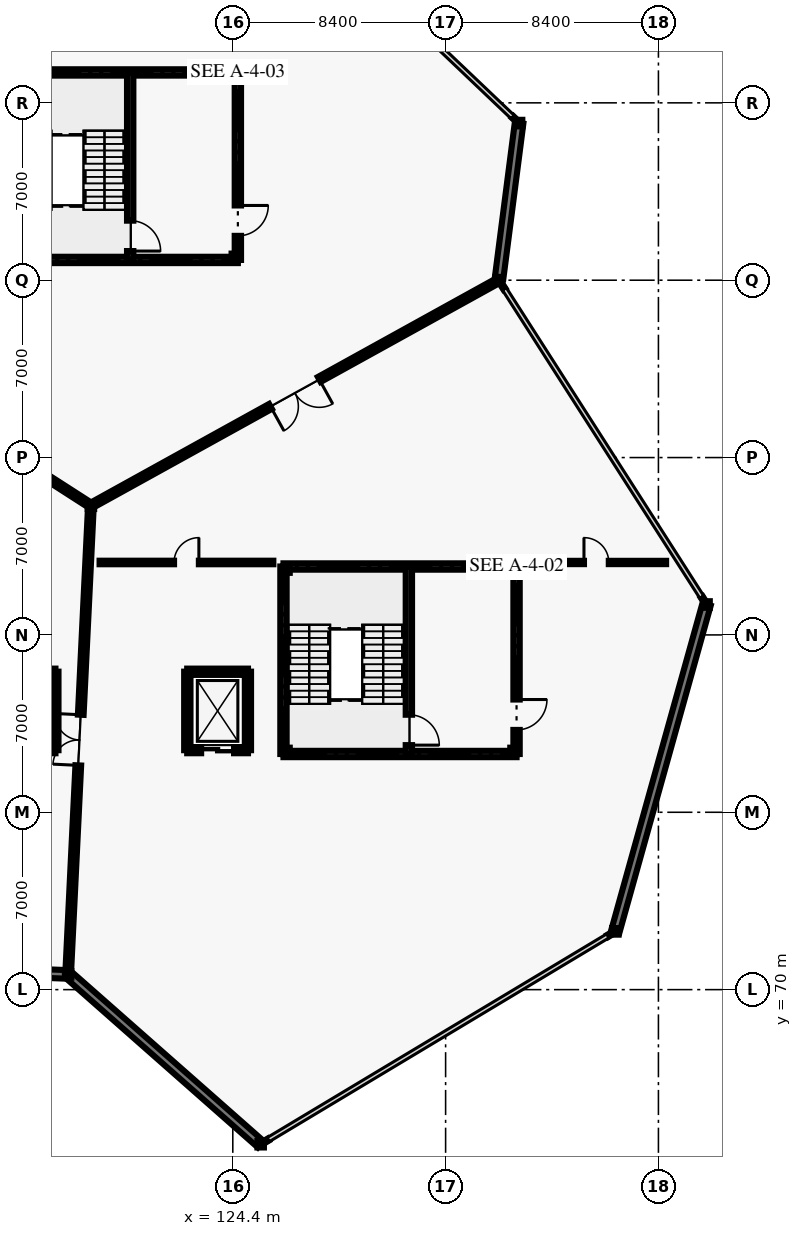
"""IFC4 building model, lengths in metres.
Left out: names, types, materials, properties, quantities, classifications, styles, units other than length and angle.
Written with IfcOpenShell. Run it as: python <this file> out.ifc"""

import sys

from ifc_helpers import new_model, si_unit, direction, frame, frame_2d, origin, origin_2d, place, context, subcontext, project, spatial, rectangle, i_section, extrude, element, fill, save


model = new_model("IFC4")
c1 = context("Model", 3, precision=1e-05, world=origin(), true_north=direction((0.0, 1.0)))
c2 = subcontext(c1, "Body", "Model", "MODEL_VIEW")
j1 = project(units=[si_unit("LENGTHUNIT", "METRE"), si_unit("PLANEANGLEUNIT", "RADIAN")], contexts=[c1])
p1 = place(None, origin())
s1 = spatial("IfcSite", under=j1, at=p1, CompositionType="ELEMENT")
p2 = place(p1, origin())
s2 = spatial("IfcBuilding", under=s1, at=p2, CompositionType="ELEMENT")
p3 = place(p2, frame((0.0, 0.0, 19.8)))
s3 = spatial("IfcBuildingStorey", under=s2, at=p3, CompositionType="ELEMENT", Elevation=19.8)
for number, where, z_axis, x_axis in (
    (1, (117.9, 70.6, 0.0), (0.0, 0.0, 1.0), (1.0, 0.0, 0.0)),
    (2, (118.8, 89.1, 0.0), (0.0, 0.0, 1.0), (1.0, 0.0, 0.0)),
    (3, (125.5, 63.9, 0.0), (0.0, 0.0, 1.0), (1.0, 0.0, 0.0)),
    (4, (134.9, 98.0, 0.0), (0.0, 0.0, 1.0), (1.0, 0.0, 0.0)),
    (5, (135.7, 104.2, 0.0), (0.0, 0.0, 1.0), (1.0, 0.0, 0.0)),
    (6, (139.5, 72.3, 0.0), (0.0, 0.0, 1.0), (1.0, 0.0, 0.0)),
    (7, (143.1, 85.2, 0.0), (0.0, 0.0, 1.0), (1.0, 0.0, 0.0)),
    (8, (126.52, 79.42, 0.0), (0.0, 0.0, 1.0), (1.0, 0.0, 0.0)),
    (9, (135.48, 79.42, 0.0), (0.0, 0.0, 1.0), (1.0, 0.0, 0.0)),
    (10, (135.48, 86.58, 0.0), (0.0, 0.0, 1.0), (1.0, 0.0, 0.0)),
    (11, (126.52, 86.58, 0.0), (0.0, 0.0, 1.0), (1.0, 0.0, 0.0)),
    (12, (124.48, 98.92, 0.0), (0.0, 0.0, 1.0), (1.0, 0.0, 0.0)),
    (13, (124.48, 106.08, 0.0), (0.0, 0.0, 1.0), (1.0, 0.0, 0.0)),
):
    element("IfcColumn", number, at=place(p3, frame(where, z_axis=z_axis, x_axis=x_axis)), inside=s3, PredefinedType="COLUMN", context=c2, shape_type="SweptSolid", body=[
        extrude(i_section(OverallWidth=0.256, OverallDepth=0.26, WebThickness=0.01, FlangeThickness=0.017, FilletRadius=0.013, at=origin_2d()), origin(), (0.0, 0.0, 1.0), 9.0),
    ])
p4 = place(p3, frame((117.84, 70.602, 0.0), z_axis=(0.0, 0.0, 1.0), x_axis=(-0.999284381651, 0.037824920194, 0.0)))
e14 = element("IfcWall", 14, at=p4, inside=s3, PredefinedType="SOLIDWALL", context=c2, shape_type="SweptSolid", body=[
    extrude(rectangle(XDim=18.453, YDim=0.34, at=frame_2d((9.227, 0.0))), origin(), (0.0, 0.0, 1.0), 7.82),
])
p5 = place(p3, frame((125.5, 63.9, 0.0), z_axis=(0.0, 0.0, 1.0), x_axis=(-0.750131359252, 0.661288850554, 0.0)))
e15 = element("IfcWall", 15, at=p5, inside=s3, PredefinedType="SOLIDWALL", context=c2, shape_type="SweptSolid", body=[
    extrude(rectangle(XDim=10.072, YDim=0.34, at=frame_2d((5.036, 0.0))), origin(), (0.0, 0.0, 1.0), 7.82),
])
for number, where, z_axis, x_axis in (
    (16, (139.464, 72.278, 0.0), (0.0, 0.0, 1.0), (-0.858, -0.513, 0.0)),
    (17, (125.8, 64.08, 0.0), (0.0, 0.0, 1.0), (-0.858, -0.513, 0.0)),
):
    element("IfcWall", number, at=place(p3, frame(where, z_axis=z_axis, x_axis=x_axis)), inside=s3, PredefinedType="SOLIDWALL", context=c2, shape_type="SweptSolid", body=[
        extrude(rectangle(XDim=0.308, YDim=0.095, at=frame_2d((0.154, 0.0))), origin(), (0.0, 0.0, 1.0), 7.82),
    ])
p6 = place(p3, frame((143.1, 85.2, 0.0), z_axis=(0.0, 0.0, 1.0), x_axis=(-0.268807620494, -0.96319388659, 0.0)))
e18 = element("IfcWall", 18, at=p6, inside=s3, PredefinedType="SOLIDWALL", context=c2, shape_type="SweptSolid", body=[
    extrude(rectangle(XDim=13.393, YDim=0.34, at=frame_2d((6.696, 0.0))), origin(), (0.0, 0.0, 1.0), 7.82),
])
for number, where, z_axis, x_axis in (
    (19, (134.955, 97.915, 0.0), (0.0, 0.0, 1.0), (0.538, -0.843, 0.0)),
    (20, (142.911, 85.495, 0.0), (0.0, 0.0, 1.0), (0.538, -0.843, 0.0)),
):
    element("IfcWall", number, at=place(p3, frame(where, z_axis=z_axis, x_axis=x_axis)), inside=s3, PredefinedType="SOLIDWALL", context=c2, shape_type="SweptSolid", body=[
        extrude(rectangle(XDim=0.309, YDim=0.095, at=frame_2d((0.154, 0.0))), origin(), (0.0, 0.0, 1.0), 7.82),
    ])
p7 = place(p3, frame((135.7, 104.2, 0.0), z_axis=(0.0, 0.0, 1.0), x_axis=(-0.127911284164, -0.99178561362, 0.0)))
e21 = element("IfcWall", 21, at=p7, inside=s3, PredefinedType="SOLIDWALL", context=c2, shape_type="SweptSolid", body=[
    extrude(rectangle(XDim=6.192, YDim=0.34, at=frame_2d((3.096, 0.0))), origin(), (0.0, 0.0, 1.0), 7.82),
])
p8 = place(p3, frame((135.446, 104.441, 0.0), z_axis=(0.0, 0.0, 1.0), x_axis=(0.726243974232, -0.687437044311, 0.0)))
e22 = element("IfcWall", 22, at=p8, inside=s3, PredefinedType="SOLIDWALL", context=c2, shape_type="SweptSolid", body=[
    extrude(rectangle(XDim=0.308, YDim=0.095, at=frame_2d((0.154, 0.0))), origin(), (0.0, 0.0, 1.0), 7.82),
])
p9 = place(p3, frame((117.9, 70.6, 0.0), z_axis=(0.0, 0.0, 1.0), x_axis=(0.048599072515, 0.998818366947, 0.0)))
e23 = element("IfcWall", 23, at=p9, inside=s3, PredefinedType="SOLIDWALL", context=c2, shape_type="SweptSolid", body=[
    extrude(rectangle(XDim=18.522, YDim=0.225, at=frame_2d((9.261, 0.0))), origin(), (0.0, 0.0, 1.0), 8.22),
])
p10 = place(p9, frame((8.261, 0.0, 0.0)))
e24 = element("IfcOpeningElement", 24, at=p10, cuts=e23, PredefinedType="OPENING", context=c2, shape_type="SweptSolid", body=[
    extrude(rectangle(XDim=2.0, YDim=2.5, at=frame_2d((1.0, 1.25))), frame((0.0, 0.123, 0.0), z_axis=(0.0, -1.0, 0.0), x_axis=(1.0, 0.0, 0.0)), (0.0, 0.0, 1.0), 0.245),
])
p11 = place(p3, frame((118.8, 89.1, 0.0), z_axis=(0.0, 0.0, 1.0), x_axis=(-0.841183241423, 0.540750177392, 0.0)))
e25 = element("IfcWall", 25, at=p11, inside=s3, PredefinedType="SOLIDWALL", context=c2, shape_type="SweptSolid", body=[
    extrude(rectangle(XDim=18.308, YDim=0.225, at=frame_2d((9.154, 0.0))), origin(), (0.0, 0.0, 1.0), 8.22),
])
p12 = place(p11, frame((8.229, 0.0, 0.0)))
e26 = element("IfcOpeningElement", 26, at=p12, cuts=e25, PredefinedType="OPENING", context=c2, shape_type="SweptSolid", body=[
    extrude(rectangle(XDim=1.85, YDim=2.4, at=frame_2d((0.925, 1.2))), frame((0.0, 0.123, 0.0), z_axis=(0.0, -1.0, 0.0), x_axis=(1.0, 0.0, 0.0)), (0.0, 0.0, 1.0), 0.245),
])
p13 = place(p3, frame((134.9, 98.0, 0.0), z_axis=(0.0, 0.0, 1.0), x_axis=(-0.875181353329, -0.483794996652, 0.0)))
e27 = element("IfcWall", 27, at=p13, inside=s3, PredefinedType="SOLIDWALL", context=c2, shape_type="SweptSolid", body=[
    extrude(rectangle(XDim=18.396, YDim=0.225, at=frame_2d((9.198, 0.0))), origin(), (0.0, 0.0, 1.0), 8.22),
])
p14 = place(p13, frame((8.098, 0.0, 0.0)))
e28 = element("IfcOpeningElement", 28, at=p14, cuts=e27, PredefinedType="OPENING", context=c2, shape_type="SweptSolid", body=[
    extrude(rectangle(XDim=2.2, YDim=2.6, at=frame_2d((1.1, 1.3))), frame((0.0, 0.123, 0.0), z_axis=(0.0, -1.0, 0.0), x_axis=(1.0, 0.0, 0.0)), (0.0, 0.0, 1.0), 0.245),
])
p15 = place(p3, frame((119.142, 86.859, 0.0), z_axis=(0.0, 0.0, 1.0), x_axis=(1.0, 0.0, 0.0)))
e29 = element("IfcWall", 29, at=p15, inside=s3, PredefinedType="PARTITIONING", context=c2, shape_type="SweptSolid", body=[
    extrude(rectangle(XDim=6.858, YDim=0.14, at=frame_2d((3.429, 0.0))), origin(), (0.0, 0.0, 1.0), 7.52),
])
p16 = place(p15, frame((2.939, 0.0, 0.0)))
e30 = element("IfcOpeningElement", 30, at=p16, cuts=e29, PredefinedType="OPENING", context=c2, shape_type="SweptSolid", body=[
    extrude(rectangle(XDim=0.98, YDim=2.15, at=frame_2d((0.49, 1.075))), frame((0.0, 0.08, 0.0), z_axis=(0.0, -1.0, 0.0), x_axis=(1.0, 0.0, 0.0)), (0.0, 0.0, 1.0), 0.16),
])
p17 = place(p3, frame((136.0, 86.859, 0.0), z_axis=(0.0, 0.0, 1.0), x_axis=(1.0, 0.0, 0.0)))
e31 = element("IfcWall", 31, at=p17, inside=s3, PredefinedType="PARTITIONING", context=c2, shape_type="SweptSolid", body=[
    extrude(rectangle(XDim=5.503, YDim=0.13, at=frame_2d((2.751, 0.0))), origin(), (0.0, 0.0, 1.0), 7.52),
])
p18 = place(p17, frame((2.261, 0.0, 0.0)))
e32 = element("IfcOpeningElement", 32, at=p18, cuts=e31, PredefinedType="OPENING", context=c2, shape_type="SweptSolid", body=[
    extrude(rectangle(XDim=0.98, YDim=2.15, at=frame_2d((0.49, 1.075))), frame((0.0, 0.075, 0.0), z_axis=(0.0, -1.0, 0.0), x_axis=(1.0, 0.0, 0.0)), (0.0, 0.0, 1.0), 0.15),
])
p19 = place(p3, frame((126.4, 79.3, 0.0), z_axis=(0.0, 0.0, 1.0), x_axis=(0.0, 1.0, 0.0)))
e33 = element("IfcWall", 33, at=p19, inside=s3, PredefinedType="SHEAR", context=c2, shape_type="SweptSolid", body=[
    extrude(rectangle(XDim=7.4, YDim=0.25, at=frame_2d((3.7, 0.0))), origin(), (0.0, 0.0, 1.0), 8.76),
])
for number, where, z_axis, x_axis in (
    (34, (126.4, 86.7, 0.0), (0.0, 0.0, 1.0), (1.0, 0.0, 0.0)),
    (35, (135.6, 79.3, 0.0), (0.0, 0.0, 1.0), (-1.0, 0.0, 0.0)),
):
    element("IfcWall", number, at=place(p3, frame(where, z_axis=z_axis, x_axis=x_axis)), inside=s3, PredefinedType="SHEAR", context=c2, shape_type="SweptSolid", body=[
        extrude(rectangle(XDim=9.2, YDim=0.25, at=frame_2d((4.6, 0.0))), origin(), (0.0, 0.0, 1.0), 8.76),
    ])
p20 = place(p3, frame((135.6, 86.7, 0.0), z_axis=(0.0, 0.0, 1.0), x_axis=(0.0, -1.0, 0.0)))
e36 = element("IfcWall", 36, at=p20, inside=s3, PredefinedType="SHEAR", context=c2, shape_type="SweptSolid", body=[
    extrude(rectangle(XDim=7.4, YDim=0.25, at=frame_2d((3.7, 0.0))), origin(), (0.0, 0.0, 1.0), 8.76),
])
p21 = place(p20, frame((5.25, 0.0, 0.0)))
e37 = element("IfcOpeningElement", 37, at=p21, cuts=e36, PredefinedType="OPENING", context=c2, shape_type="SweptSolid", body=[
    extrude(rectangle(XDim=1.2, YDim=2.2, at=frame_2d((0.6, 1.1))), frame((0.0, 0.135, 0.0), z_axis=(0.0, -1.0, 0.0), x_axis=(1.0, 0.0, 0.0)), (0.0, 0.0, 1.0), 0.27),
])
p22 = place(p3, frame((131.35, 86.7, 0.0), z_axis=(0.0, 0.0, 1.0), x_axis=(0.0, -1.0, 0.0)))
e38 = element("IfcWall", 38, at=p22, inside=s3, PredefinedType="SHEAR", context=c2, shape_type="SweptSolid", body=[
    extrude(rectangle(XDim=7.4, YDim=0.25, at=frame_2d((3.7, 0.0))), origin(), (0.0, 0.0, 1.0), 8.76),
])
p23 = place(p22, frame((5.85, 0.0, 0.0)))
e39 = element("IfcOpeningElement", 39, at=p23, cuts=e38, PredefinedType="OPENING", context=c2, shape_type="SweptSolid", body=[
    extrude(rectangle(XDim=1.2, YDim=2.2, at=frame_2d((0.6, 1.1))), frame((0.0, 0.135, 0.0), z_axis=(0.0, -1.0, 0.0), x_axis=(1.0, 0.0, 0.0)), (0.0, 0.0, 1.0), 0.27),
])
for number, where, z_axis, x_axis in (
    (40, (115.4, 106.2, 0.0), (0.0, 0.0, 1.0), (1.0, 0.0, 0.0)),
    (41, (124.6, 98.8, 0.0), (0.0, 0.0, 1.0), (-1.0, 0.0, 0.0)),
):
    element("IfcWall", number, at=place(p3, frame(where, z_axis=z_axis, x_axis=x_axis)), inside=s3, PredefinedType="SHEAR", context=c2, shape_type="SweptSolid", body=[
        extrude(rectangle(XDim=9.2, YDim=0.25, at=frame_2d((4.6, 0.0))), origin(), (0.0, 0.0, 1.0), 8.76),
    ])
p24 = place(p3, frame((124.6, 106.2, 0.0), z_axis=(0.0, 0.0, 1.0), x_axis=(0.0, -1.0, 0.0)))
e42 = element("IfcWall", 42, at=p24, inside=s3, PredefinedType="SHEAR", context=c2, shape_type="SweptSolid", body=[
    extrude(rectangle(XDim=7.4, YDim=0.25, at=frame_2d((3.7, 0.0))), origin(), (0.0, 0.0, 1.0), 8.76),
])
p25 = place(p24, frame((5.25, 0.0, 0.0)))
e43 = element("IfcOpeningElement", 43, at=p25, cuts=e42, PredefinedType="OPENING", context=c2, shape_type="SweptSolid", body=[
    extrude(rectangle(XDim=1.2, YDim=2.2, at=frame_2d((0.6, 1.1))), frame((0.0, 0.135, 0.0), z_axis=(0.0, -1.0, 0.0), x_axis=(1.0, 0.0, 0.0)), (0.0, 0.0, 1.0), 0.27),
])
p26 = place(p3, frame((120.35, 106.2, 0.0), z_axis=(0.0, 0.0, 1.0), x_axis=(0.0, -1.0, 0.0)))
e44 = element("IfcWall", 44, at=p26, inside=s3, PredefinedType="SHEAR", context=c2, shape_type="SweptSolid", body=[
    extrude(rectangle(XDim=7.4, YDim=0.25, at=frame_2d((3.7, 0.0))), origin(), (0.0, 0.0, 1.0), 8.76),
])
p27 = place(p26, frame((5.85, 0.0, 0.0)))
e45 = element("IfcOpeningElement", 45, at=p27, cuts=e44, PredefinedType="OPENING", context=c2, shape_type="SweptSolid", body=[
    extrude(rectangle(XDim=1.2, YDim=2.2, at=frame_2d((0.6, 1.1))), frame((0.0, 0.135, 0.0), z_axis=(0.0, -1.0, 0.0), x_axis=(1.0, 0.0, 0.0)), (0.0, 0.0, 1.0), 0.27),
])
p28 = place(p3, frame((115.0, 82.55, 0.0), z_axis=(0.0, 0.0, 1.0), x_axis=(1.0, 0.0, 0.0)))
e46 = element("IfcWall", 46, at=p28, inside=s3, PredefinedType="SHEAR", context=c2, shape_type="SweptSolid", body=[
    extrude(rectangle(XDim=2.4, YDim=0.24, at=frame_2d((1.2, 0.0))), origin(), (0.0, 0.0, 1.0), 8.76),
])
p29 = place(p3, frame((117.4, 82.55, 0.0), z_axis=(0.0, 0.0, 1.0), x_axis=(0.0, -1.0, 0.0)))
e47 = element("IfcWall", 47, at=p29, inside=s3, PredefinedType="SHEAR", context=c2, shape_type="SweptSolid", body=[
    extrude(rectangle(XDim=3.1, YDim=0.24, at=frame_2d((1.55, 0.0))), origin(), (0.0, 0.0, 1.0), 8.76),
])
p30 = place(p3, frame((117.4, 79.45, 0.0), z_axis=(0.0, 0.0, 1.0), x_axis=(-1.0, 0.0, 0.0)))
e48 = element("IfcWall", 48, at=p30, inside=s3, PredefinedType="SHEAR", context=c2, shape_type="SweptSolid", body=[
    extrude(rectangle(XDim=2.4, YDim=0.24, at=frame_2d((1.2, 0.0))), origin(), (0.0, 0.0, 1.0), 8.76),
])
p31 = place(p30, frame((0.55, 0.0, 0.0)))
e49 = element("IfcOpeningElement", 49, at=p31, cuts=e48, PredefinedType="OPENING", context=c2, shape_type="SweptSolid", body=[
    extrude(rectangle(XDim=1.3, YDim=2.25, at=frame_2d((0.65, 1.125))), frame((0.0, 0.13, 0.0), z_axis=(0.0, -1.0, 0.0), x_axis=(1.0, 0.0, 0.0)), (0.0, 0.0, 1.0), 0.26),
])
p32 = place(p3, frame((122.6, 82.55, 0.0), z_axis=(0.0, 0.0, 1.0), x_axis=(1.0, 0.0, 0.0)))
e50 = element("IfcWall", 50, at=p32, inside=s3, PredefinedType="SHEAR", context=c2, shape_type="SweptSolid", body=[
    extrude(rectangle(XDim=2.4, YDim=0.24, at=frame_2d((1.2, 0.0))), origin(), (0.0, 0.0, 1.0), 8.76),
])
for number, where, z_axis, x_axis in (
    (51, (125.0, 82.55, 0.0), (0.0, 0.0, 1.0), (0.0, -1.0, 0.0)),
    (52, (122.6, 79.45, 0.0), (0.0, 0.0, 1.0), (0.0, 1.0, 0.0)),
):
    element("IfcWall", number, at=place(p3, frame(where, z_axis=z_axis, x_axis=x_axis)), inside=s3, PredefinedType="SHEAR", context=c2, shape_type="SweptSolid", body=[
        extrude(rectangle(XDim=3.1, YDim=0.24, at=frame_2d((1.55, 0.0))), origin(), (0.0, 0.0, 1.0), 8.76),
    ])
p33 = place(p3, frame((125.0, 79.45, 0.0), z_axis=(0.0, 0.0, 1.0), x_axis=(-1.0, 0.0, 0.0)))
e53 = element("IfcWall", 53, at=p33, inside=s3, PredefinedType="SHEAR", context=c2, shape_type="SweptSolid", body=[
    extrude(rectangle(XDim=2.4, YDim=0.24, at=frame_2d((1.2, 0.0))), origin(), (0.0, 0.0, 1.0), 8.76),
])
p34 = place(p33, frame((0.55, 0.0, 0.0)))
e54 = element("IfcOpeningElement", 54, at=p34, cuts=e53, PredefinedType="OPENING", context=c2, shape_type="SweptSolid", body=[
    extrude(rectangle(XDim=1.3, YDim=2.25, at=frame_2d((0.65, 1.125))), frame((0.0, 0.13, 0.0), z_axis=(0.0, -1.0, 0.0), x_axis=(1.0, 0.0, 0.0)), (0.0, 0.0, 1.0), 0.26),
])
p35 = place(p10, origin())
e55 = element("IfcDoor", 55, at=p35, inside=s3, OperationType="DOUBLE_DOOR_SINGLE_SWING", PredefinedType="DOOR", context=c2, shape_type="SweptSolid", body=[
    extrude(rectangle(XDim=2.0, YDim=2.5, at=frame_2d((1.0, 1.25))), frame((0.0, 0.025, 0.0), z_axis=(0.0, -1.0, 0.0), x_axis=(1.0, 0.0, 0.0)), (0.0, 0.0, 1.0), 0.05),
])
fill(e24, e55)
p36 = place(p14, origin())
e56 = element("IfcDoor", 56, at=p36, inside=s3, OperationType="DOUBLE_DOOR_SINGLE_SWING", PredefinedType="DOOR", context=c2, shape_type="SweptSolid", body=[
    extrude(rectangle(XDim=2.2, YDim=2.6, at=frame_2d((1.1, 1.3))), frame((0.0, 0.025, 0.0), z_axis=(0.0, -1.0, 0.0), x_axis=(1.0, 0.0, 0.0)), (0.0, 0.0, 1.0), 0.05),
])
fill(e28, e56)
p37 = place(p16, origin())
e57 = element("IfcDoor", 57, at=p37, inside=s3, OperationType="SINGLE_SWING_RIGHT", PredefinedType="DOOR", context=c2, shape_type="SweptSolid", body=[
    extrude(rectangle(XDim=0.98, YDim=2.15, at=frame_2d((0.49, 1.075))), frame((0.0, 0.025, 0.0), z_axis=(0.0, -1.0, 0.0), x_axis=(1.0, 0.0, 0.0)), (0.0, 0.0, 1.0), 0.05),
])
fill(e30, e57)
p38 = place(p18, origin())
e58 = element("IfcDoor", 58, at=p38, inside=s3, OperationType="SINGLE_SWING_LEFT", PredefinedType="DOOR", context=c2, shape_type="SweptSolid", body=[
    extrude(rectangle(XDim=0.98, YDim=2.15, at=frame_2d((0.49, 1.075))), frame((0.0, 0.025, 0.0), z_axis=(0.0, -1.0, 0.0), x_axis=(1.0, 0.0, 0.0)), (0.0, 0.0, 1.0), 0.05),
])
fill(e32, e58)
p39 = place(p21, origin())
e59 = element("IfcDoor", 59, at=p39, inside=s3, OperationType="SINGLE_SWING_LEFT", PredefinedType="DOOR", context=c2, shape_type="SweptSolid", body=[
    extrude(rectangle(XDim=1.2, YDim=2.2, at=frame_2d((0.6, 1.1))), frame((0.0, 0.025, 0.0), z_axis=(0.0, -1.0, 0.0), x_axis=(1.0, 0.0, 0.0)), (0.0, 0.0, 1.0), 0.05),
])
fill(e37, e59)
p40 = place(p23, origin())
e60 = element("IfcDoor", 60, at=p40, inside=s3, OperationType="SINGLE_SWING_RIGHT", PredefinedType="DOOR", context=c2, shape_type="SweptSolid", body=[
    extrude(rectangle(XDim=1.2, YDim=2.2, at=frame_2d((0.6, 1.1))), frame((0.0, 0.025, 0.0), z_axis=(0.0, -1.0, 0.0), x_axis=(1.0, 0.0, 0.0)), (0.0, 0.0, 1.0), 0.05),
])
fill(e39, e60)
p41 = place(p25, origin())
e61 = element("IfcDoor", 61, at=p41, inside=s3, OperationType="SINGLE_SWING_LEFT", PredefinedType="DOOR", context=c2, shape_type="SweptSolid", body=[
    extrude(rectangle(XDim=1.2, YDim=2.2, at=frame_2d((0.6, 1.1))), frame((0.0, 0.025, 0.0), z_axis=(0.0, -1.0, 0.0), x_axis=(1.0, 0.0, 0.0)), (0.0, 0.0, 1.0), 0.05),
])
fill(e43, e61)
p42 = place(p27, origin())
e62 = element("IfcDoor", 62, at=p42, inside=s3, OperationType="SINGLE_SWING_RIGHT", PredefinedType="DOOR", context=c2, shape_type="SweptSolid", body=[
    extrude(rectangle(XDim=1.2, YDim=2.2, at=frame_2d((0.6, 1.1))), frame((0.0, 0.025, 0.0), z_axis=(0.0, -1.0, 0.0), x_axis=(1.0, 0.0, 0.0)), (0.0, 0.0, 1.0), 0.05),
])
fill(e45, e62)
p43 = place(p34, origin())
e63 = element("IfcDoor", 63, at=p43, inside=s3, OperationType="SLIDING_TO_LEFT", PredefinedType="DOOR", context=c2, shape_type="SweptSolid", body=[
    extrude(rectangle(XDim=1.3, YDim=2.25, at=frame_2d((0.65, 1.125))), frame((0.0, 0.025, 0.0), z_axis=(0.0, -1.0, 0.0), x_axis=(1.0, 0.0, 0.0)), (0.0, 0.0, 1.0), 0.05),
])
fill(e54, e63)
save(model, sys.argv[1])
